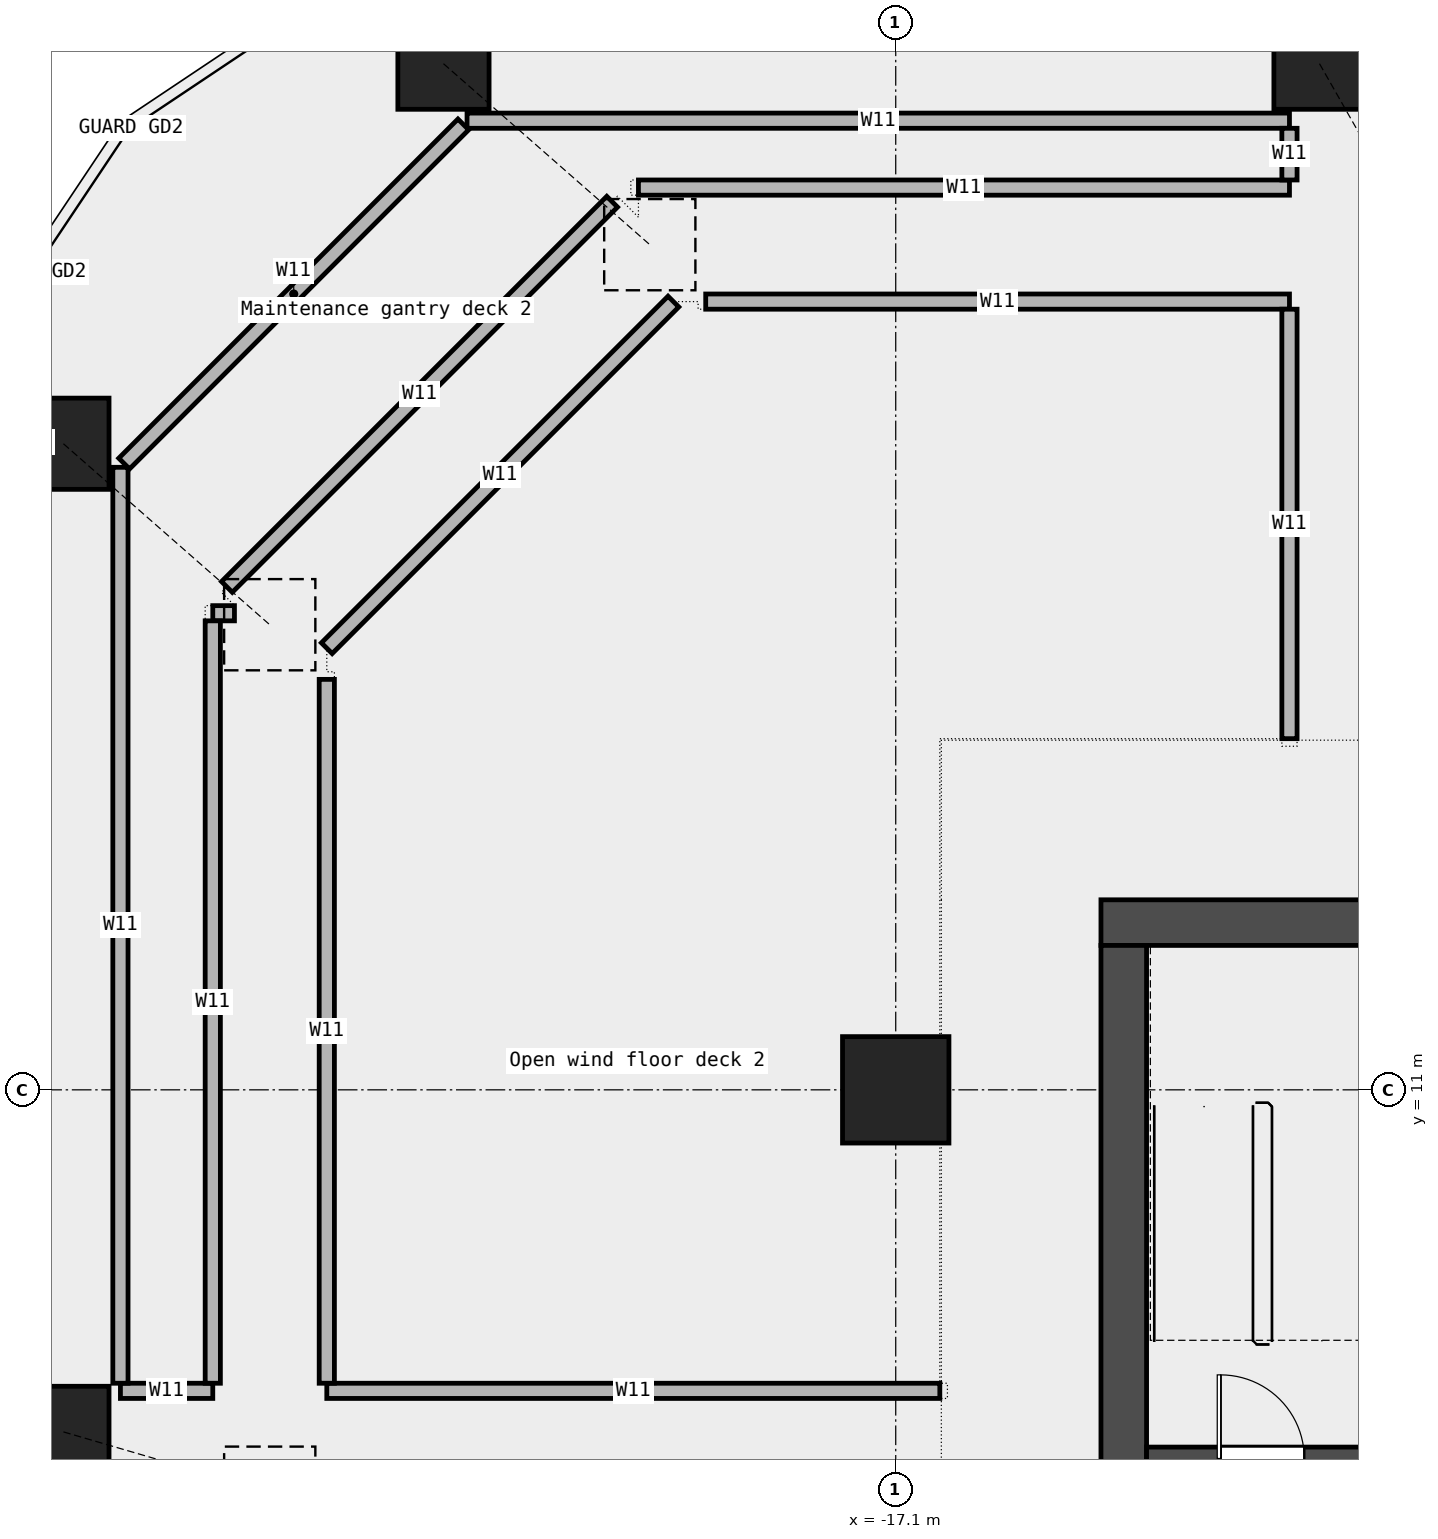
"""IFC4 building model, lengths in metres.
Left out: names, types, materials, properties, quantities, classifications, styles, units other than length and angle.
Written with IfcOpenShell. Run it as: python <this file> out.ifc"""

import sys

from ifc_helpers import new_model, si_unit, direction, frame, frame_2d, origin, origin_2d, place, context, subcontext, project, spatial, rectangle, extrude, element, fill, save


model = new_model("IFC4")
c1 = context("Model", 3, precision=1e-05, world=origin(), true_north=direction((0.0, 1.0)))
c2 = subcontext(c1, "Body", "Model", "MODEL_VIEW")
j1 = project(units=[si_unit("LENGTHUNIT", "METRE"), si_unit("PLANEANGLEUNIT", "RADIAN")], contexts=[c1])
p1 = place(None, origin())
s1 = spatial("IfcSite", under=j1, at=p1, CompositionType="ELEMENT")
p2 = place(p1, origin())
s2 = spatial("IfcBuilding", under=s1, at=p2, CompositionType="ELEMENT")
p3 = place(p2, frame((0.0, 0.0, 148.6)))
s3 = spatial("IfcBuildingStorey", under=s2, at=p3, CompositionType="ELEMENT", Elevation=148.6)
p4 = place(p3, frame((-11.525, 24.5, 0.0), z_axis=(0.160463379213, -0.281547116603, 0.94603526629), x_axis=(0.868801799195, 0.495160008196, 0.0)))
e1 = element("IfcColumn", 1, at=p4, inside=s3, PredefinedType="COLUMN", context=c2, shape_type="SweptSolid", body=[
    extrude(rectangle(XDim=1.2, YDim=1.2, at=origin_2d()), origin(), (0.0, 0.0, 1.0), 8.456),
])
for number, where, z_axis, x_axis in (
    (2, (-23.05, 24.5, 0.0), (0.309, -0.271, 0.911), (0.659, 0.752, 0.0)),
    (3, (-28.05, 19.5, 0.0), (0.309, -0.271, 0.911), (0.659, 0.752, 0.0)),
):
    element("IfcColumn", number, at=place(p3, frame(where, z_axis=z_axis, x_axis=x_axis)), inside=s3, PredefinedType="COLUMN", context=c2, shape_type="SweptSolid", body=[
        extrude(rectangle(XDim=1.2, YDim=1.2, at=origin_2d()), origin(), (0.0, 0.0, 1.0), 8.777),
    ])
p5 = place(p3, frame((-28.05, 6.5, 0.0), z_axis=(0.319895858585, -0.093511561468, 0.942826721902), x_axis=(0.280576780783, 0.95983158423, 0.0)))
e4 = element("IfcColumn", 4, at=p5, inside=s3, PredefinedType="COLUMN", context=c2, shape_type="SweptSolid", body=[
    extrude(rectangle(XDim=1.2, YDim=1.2, at=origin_2d()), origin(), (0.0, 0.0, 1.0), 8.485),
])
p6 = place(p3, frame((-17.1, 11.0, 0.0), z_axis=(0.0, 0.0, 1.0), x_axis=(1.0, 0.0, 0.0)))
e5 = element("IfcColumn", 5, at=p6, inside=s3, PredefinedType="COLUMN", context=c2, shape_type="SweptSolid", body=[
    extrude(rectangle(XDim=1.4, YDim=1.4, at=origin_2d()), origin(), (0.0, 0.0, 1.0), 8.0),
])
p7 = place(p3, frame((-27.3, 7.04, 0.0), z_axis=(0.0, 0.0, 1.0), x_axis=(1.0, 0.0, 0.0)))
e6 = element("IfcWall", 6, at=p7, inside=s3, PredefinedType="PARTITIONING", context=c2, shape_type="SweptSolid", body=[
    extrude(rectangle(XDim=1.215, YDim=0.2, at=frame_2d((0.607, 0.0))), origin(), (0.0, 0.0, 1.0), 8.0),
])
p8 = place(p3, frame((-24.585, 7.04, 0.0), z_axis=(0.0, 0.0, 1.0), x_axis=(1.0, 0.0, 0.0)))
e7 = element("IfcWall", 7, at=p8, inside=s3, PredefinedType="PARTITIONING", context=c2, shape_type="SweptSolid", body=[
    extrude(rectangle(XDim=8.065, YDim=0.2, at=frame_2d((4.032, 0.0))), origin(), (0.0, 0.0, 1.0), 8.0),
])
p9 = place(p3, frame((-26.085, 17.27, 0.0), z_axis=(0.0, 0.0, 1.0), x_axis=(1.0, 0.0, 0.0)))
e8 = element("IfcWall", 8, at=p9, inside=s3, PredefinedType="PARTITIONING", context=c2, shape_type="SweptSolid", body=[
    extrude(rectangle(XDim=0.285, YDim=0.2, at=frame_2d((0.143, 0.0))), origin(), (0.0, 0.0, 1.0), 8.0),
])
p10 = place(p3, frame((-19.6, 21.37, 0.0), z_axis=(0.0, 0.0, 1.0), x_axis=(1.0, 0.0, 0.0)))
e9 = element("IfcWall", 9, at=p10, inside=s3, PredefinedType="PARTITIONING", context=c2, shape_type="SweptSolid", body=[
    extrude(rectangle(XDim=7.68, YDim=0.2, at=frame_2d((3.84, 0.0))), origin(), (0.0, 0.0, 1.0), 8.0),
])
p11 = place(p3, frame((-20.485, 22.87, 0.0), z_axis=(0.0, 0.0, 1.0), x_axis=(1.0, 0.0, 0.0)))
e10 = element("IfcWall", 10, at=p11, inside=s3, PredefinedType="PARTITIONING", context=c2, shape_type="SweptSolid", body=[
    extrude(rectangle(XDim=8.565, YDim=0.2, at=frame_2d((4.283, 0.0))), origin(), (0.0, 0.0, 1.0), 8.0),
])
p12 = place(p3, frame((-22.74, 23.75, 0.0), z_axis=(0.0, 0.0, 1.0), x_axis=(1.0, 0.0, 0.0)))
e11 = element("IfcWall", 11, at=p12, inside=s3, PredefinedType="PARTITIONING", context=c2, shape_type="SweptSolid", body=[
    extrude(rectangle(XDim=10.82, YDim=0.2, at=frame_2d((5.41, 0.0))), origin(), (0.0, 0.0, 1.0), 8.0),
])
p13 = place(p3, frame((-27.3, 7.14, 0.0), z_axis=(0.0, 0.0, 1.0), x_axis=(0.0, 1.0, 0.0)))
e12 = element("IfcWall", 12, at=p13, inside=s3, PredefinedType="PARTITIONING", context=c2, shape_type="SweptSolid", body=[
    extrude(rectangle(XDim=12.05, YDim=0.2, at=frame_2d((6.025, 0.0))), origin(), (0.0, 0.0, 1.0), 8.0),
])
p14 = place(p3, frame((-26.085, 7.14, 0.0), z_axis=(0.0, 0.0, 1.0), x_axis=(0.0, 1.0, 0.0)))
e13 = element("IfcWall", 13, at=p14, inside=s3, PredefinedType="PARTITIONING", context=c2, shape_type="SweptSolid", body=[
    extrude(rectangle(XDim=10.03, YDim=0.2, at=frame_2d((5.015, 0.0))), origin(), (0.0, 0.0, 1.0), 8.0),
])
p15 = place(p3, frame((-24.585, 7.14, 0.0), z_axis=(0.0, 0.0, 1.0), x_axis=(0.0, 1.0, 0.0)))
e14 = element("IfcWall", 14, at=p15, inside=s3, PredefinedType="PARTITIONING", context=c2, shape_type="SweptSolid", body=[
    extrude(rectangle(XDim=9.26, YDim=0.2, at=frame_2d((4.63, 0.0))), origin(), (0.0, 0.0, 1.0), 8.0),
])
p16 = place(p3, frame((-11.92, 15.62, 0.0), z_axis=(0.0, 0.0, 1.0), x_axis=(0.0, 1.0, 0.0)))
e15 = element("IfcWall", 15, at=p16, inside=s3, PredefinedType="PARTITIONING", context=c2, shape_type="SweptSolid", body=[
    extrude(rectangle(XDim=5.65, YDim=0.2, at=frame_2d((2.825, 0.0))), origin(), (0.0, 0.0, 1.0), 8.0),
])
p17 = place(p3, frame((-11.92, 22.97, 0.0), z_axis=(0.0, 0.0, 1.0), x_axis=(0.0, 1.0, 0.0)))
e16 = element("IfcWall", 16, at=p17, inside=s3, PredefinedType="PARTITIONING", context=c2, shape_type="SweptSolid", body=[
    extrude(rectangle(XDim=0.68, YDim=0.2, at=frame_2d((0.34, 0.0))), origin(), (0.0, 0.0, 1.0), 8.0),
])
p18 = place(p3, frame((-20.831, 22.684, 0.0), z_axis=(0.0, 0.0, 1.0), x_axis=(-0.707089749241, -0.707123812722, 0.0)))
e17 = element("IfcWall", 17, at=p18, inside=s3, PredefinedType="PARTITIONING", context=c2, shape_type="SweptSolid", body=[
    extrude(rectangle(XDim=7.167, YDim=0.2, at=frame_2d((3.583, 0.0))), origin(), (0.0, 0.0, 1.0), 8.0),
])
p19 = place(p3, frame((-27.251, 19.239, 0.0), z_axis=(0.0, 0.0, 1.0), x_axis=(0.707106781187, 0.707106781187, 0.0)))
e18 = element("IfcWall", 18, at=p19, inside=s3, PredefinedType="PARTITIONING", context=c2, shape_type="SweptSolid", body=[
    extrude(rectangle(XDim=6.31, YDim=0.2, at=frame_2d((3.155, 0.0))), origin(), (0.0, 0.0, 1.0), 8.0),
])
p20 = place(p3, frame((-24.585, 16.81, 0.0), z_axis=(0.0, 0.0, 1.0), x_axis=(0.707106781187, 0.707106781187, 0.0)))
e19 = element("IfcWall", 19, at=p20, inside=s3, PredefinedType="PARTITIONING", context=c2, shape_type="SweptSolid", body=[
    extrude(rectangle(XDim=6.449, YDim=0.2, at=frame_2d((3.225, 0.0))), origin(), (0.0, 0.0, 1.0), 8.0),
])
p21 = place(p3, frame((-14.4, 13.2, 0.0), z_axis=(0.0, 0.0, 1.0), x_axis=(1.0, 0.0, 0.0)))
e20 = element("IfcWall", 20, at=p21, inside=s3, PredefinedType="SHEAR", context=c2, shape_type="SweptSolid", body=[
    extrude(rectangle(XDim=28.8, YDim=0.6, at=frame_2d((14.4, 0.0))), origin(), (0.0, 0.0, 1.0), 8.1),
])
p22 = place(p21, frame((5.65, 0.0, 0.0)))
e21 = element("IfcOpeningElement", 21, at=p22, cuts=e20, PredefinedType="OPENING", context=c2, shape_type="SweptSolid", body=[
    extrude(rectangle(XDim=1.0, YDim=2.1, at=frame_2d((0.5, 1.05))), frame((0.0, 0.312, 0.0), z_axis=(0.0, -1.0, 0.0), x_axis=(1.0, 0.0, 0.0)), (0.0, 0.0, 1.0), 0.624),
])
p23 = place(p21, frame((9.962, 0.0, 0.0)))
e22 = element("IfcOpeningElement", 22, at=p23, cuts=e20, PredefinedType="OPENING", context=c2, shape_type="SweptSolid", body=[
    extrude(rectangle(XDim=1.0, YDim=2.1, at=frame_2d((0.5, 1.05))), frame((0.0, 0.312, 0.0), z_axis=(0.0, -1.0, 0.0), x_axis=(1.0, 0.0, 0.0)), (0.0, 0.0, 1.0), 0.624),
])
p24 = place(p21, frame((14.837, 0.0, 0.0)))
e23 = element("IfcOpeningElement", 23, at=p24, cuts=e20, PredefinedType="OPENING", context=c2, shape_type="SweptSolid", body=[
    extrude(rectangle(XDim=1.0, YDim=2.1, at=frame_2d((0.5, 1.05))), frame((0.0, 0.312, 0.0), z_axis=(0.0, -1.0, 0.0), x_axis=(1.0, 0.0, 0.0)), (0.0, 0.0, 1.0), 0.624),
])
p25 = place(p21, frame((21.025, 0.0, 0.0)))
e24 = element("IfcOpeningElement", 24, at=p25, cuts=e20, PredefinedType="OPENING", context=c2, shape_type="SweptSolid", body=[
    extrude(rectangle(XDim=1.0, YDim=2.1, at=frame_2d((0.5, 1.05))), frame((0.0, 0.312, 0.0), z_axis=(0.0, -1.0, 0.0), x_axis=(1.0, 0.0, 0.0)), (0.0, 0.0, 1.0), 0.624),
])
p26 = place(p3, frame((-14.1, -6.6, 0.0), z_axis=(0.0, 0.0, 1.0), x_axis=(0.0, 1.0, 0.0)))
e25 = element("IfcWall", 25, at=p26, inside=s3, PredefinedType="SHEAR", context=c2, shape_type="SweptSolid", body=[
    extrude(rectangle(XDim=19.5, YDim=0.6, at=frame_2d((9.75, 0.0))), origin(), (0.0, 0.0, 1.0), 8.1),
])
p27 = place(p26, frame((9.3, 0.0, 0.0)))
e26 = element("IfcOpeningElement", 26, at=p27, cuts=e25, PredefinedType="OPENING", context=c2, shape_type="SweptSolid", body=[
    extrude(rectangle(XDim=1.8, YDim=2.1, at=frame_2d((0.9, 1.05))), frame((0.0, 0.312, 0.0), z_axis=(0.0, -1.0, 0.0), x_axis=(1.0, 0.0, 0.0)), (0.0, 0.0, 1.0), 0.624),
])
p28 = place(p3, frame((-13.8, 6.15, 0.0), z_axis=(0.0, 0.0, 1.0), x_axis=(1.0, 0.0, 0.0)))
e27 = element("IfcWall", 27, at=p28, inside=s3, PredefinedType="SOLIDWALL", context=c2, shape_type="SweptSolid", body=[
    extrude(rectangle(XDim=3.15, YDim=0.3, at=frame_2d((1.575, 0.0))), origin(), (0.0, 0.0, 1.0), 8.1),
])
p29 = place(p28, frame((0.975, 0.0, 0.0)))
e28 = element("IfcOpeningElement", 28, at=p29, cuts=e27, PredefinedType="OPENING", context=c2, shape_type="SweptSolid", body=[
    extrude(rectangle(XDim=1.1, YDim=2.1, at=frame_2d((0.55, 1.05))), frame((0.0, 0.162, 0.0), z_axis=(0.0, -1.0, 0.0), x_axis=(1.0, 0.0, 0.0)), (0.0, 0.0, 1.0), 0.324),
])
p30 = place(p29, origin())
e29 = element("IfcDoor", 29, at=p30, inside=s3, OperationType="SINGLE_SWING_LEFT", PredefinedType="DOOR", context=c2, shape_type="SweptSolid", body=[
    extrude(rectangle(XDim=1.1, YDim=2.1, at=frame_2d((0.55, 1.05))), frame((0.0, 0.025, 0.0), z_axis=(0.0, -1.0, 0.0), x_axis=(1.0, 0.0, 0.0)), (0.0, 0.0, 1.0), 0.05),
])
fill(e28, e29)
save(model, sys.argv[1])
